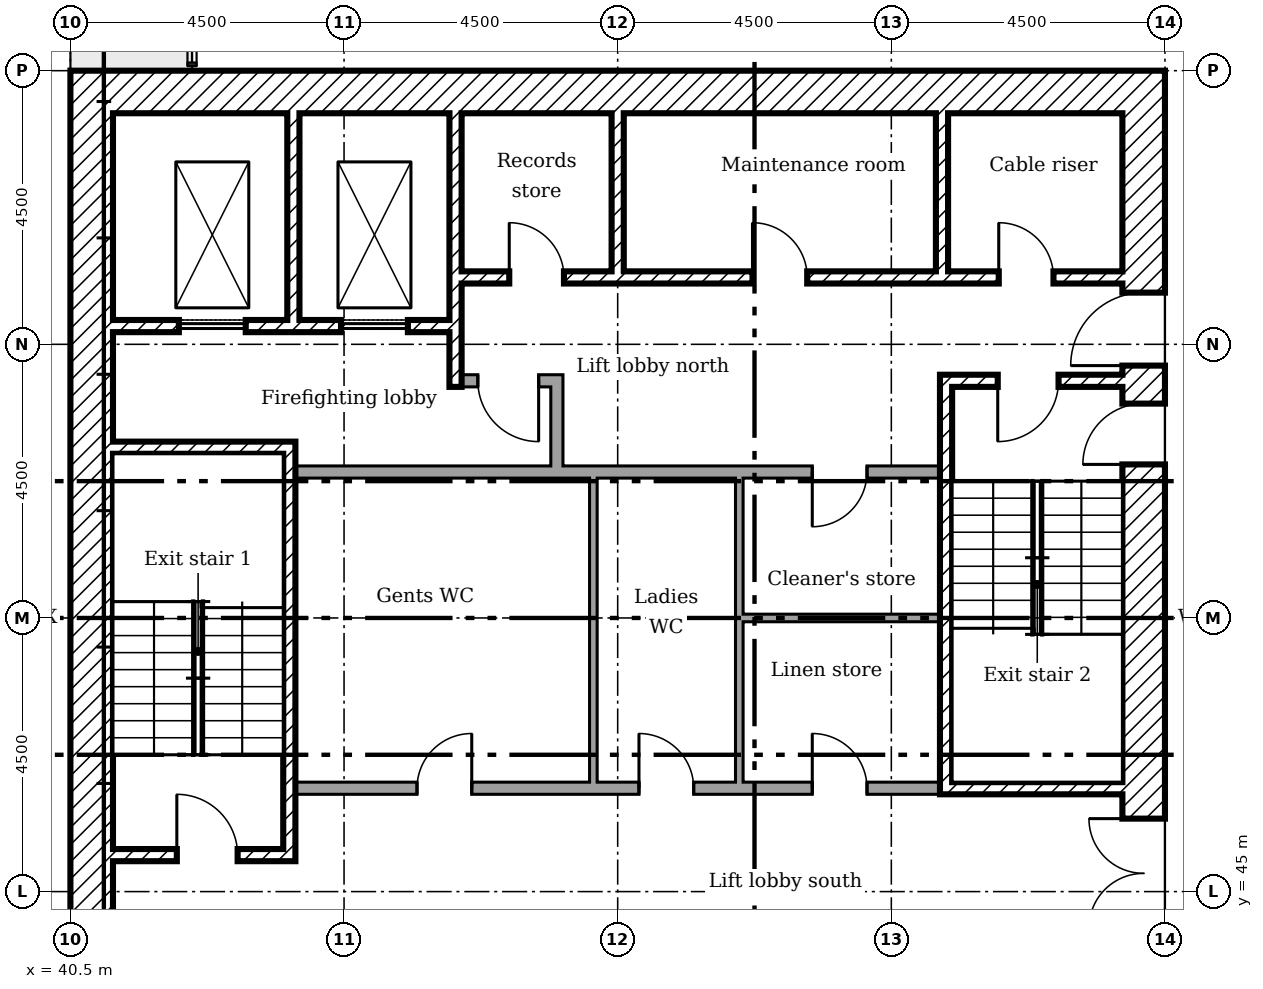
"""IFC4 building model, lengths in metres.
Left out: names, types, materials, properties, quantities, classifications, styles, units other than length and angle.
Written with IfcOpenShell. Run it as: python <this file> out.ifc"""

import sys

from ifc_helpers import new_model, si_unit, direction, frame, frame_2d, origin, place, context, subcontext, project, spatial, rectangle, extrude, element, fill, save


model = new_model("IFC4")
c1 = context("Model", 3, precision=1e-05, world=origin(), true_north=direction((0.0, 1.0)))
c2 = subcontext(c1, "Body", "Model", "MODEL_VIEW")
j1 = project(units=[si_unit("LENGTHUNIT", "METRE"), si_unit("PLANEANGLEUNIT", "RADIAN")], contexts=[c1])
p1 = place(None, origin())
s1 = spatial("IfcSite", under=j1, at=p1, CompositionType="ELEMENT")
p2 = place(p1, origin())
s2 = spatial("IfcBuilding", under=s1, at=p2, CompositionType="ELEMENT")
p3 = place(p2, frame((0.0, 0.0, 131.6)))
s3 = spatial("IfcBuildingStorey", under=s2, at=p3, CompositionType="ELEMENT", Elevation=131.6)
p4 = place(p3, frame((58.15, 40.5, 0.0), z_axis=(0.0, 0.0, 1.0), x_axis=(0.0, 1.0, 0.0)))
e1 = element("IfcWall", 1, at=p4, inside=s3, PredefinedType="SHEAR", context=c2, shape_type="SweptSolid", body=[
    extrude(rectangle(XDim=18.0, YDim=0.7, at=frame_2d((9.0, 0.0))), origin(), (0.0, 0.0, 1.0), 3.35),
])
p5 = place(p4, frame((13.15, 0.0, 0.0)))
e2 = element("IfcOpeningElement", 2, at=p5, cuts=e1, PredefinedType="OPENING", context=c2, shape_type="SweptSolid", body=[
    extrude(rectangle(XDim=1.2, YDim=2.1, at=frame_2d((0.6, 1.05))), frame((0.0, 0.36, 0.0), z_axis=(0.0, -1.0, 0.0), x_axis=(1.0, 0.0, 0.0)), (0.0, 0.0, 1.0), 0.72),
])
p6 = place(p4, frame((3.9, 0.0, 0.0)))
e3 = element("IfcOpeningElement", 3, at=p6, cuts=e1, PredefinedType="OPENING", context=c2, shape_type="SweptSolid", body=[
    extrude(rectangle(XDim=1.8, YDim=2.1, at=frame_2d((0.9, 1.05))), frame((0.0, 0.36, 0.0), z_axis=(0.0, -1.0, 0.0), x_axis=(1.0, 0.0, 0.0)), (0.0, 0.0, 1.0), 0.72),
])
p7 = place(p4, frame((11.525, 0.0, 0.0)))
e4 = element("IfcOpeningElement", 4, at=p7, cuts=e1, PredefinedType="OPENING", context=c2, shape_type="SweptSolid", body=[
    extrude(rectangle(XDim=1.0, YDim=2.1, at=frame_2d((0.5, 1.05))), frame((0.0, 0.36, 0.0), z_axis=(0.0, -1.0, 0.0), x_axis=(1.0, 0.0, 0.0)), (0.0, 0.0, 1.0), 0.72),
])
p8 = place(p3, frame((41.2, 58.15, 0.0)))
e5 = element("IfcWall", 5, at=p8, inside=s3, PredefinedType="SHEAR", context=c2, shape_type="SweptSolid", body=[
    extrude(rectangle(XDim=16.6, YDim=0.7, at=frame_2d((8.3, 0.0))), origin(), (0.0, 0.0, 1.0), 3.35),
])
p9 = place(p3, frame((40.85, 40.5, 0.0), z_axis=(0.0, 0.0, 1.0), x_axis=(0.0, 1.0, 0.0)))
e6 = element("IfcWall", 6, at=p9, inside=s3, PredefinedType="SHEAR", context=c2, shape_type="SweptSolid", body=[
    extrude(rectangle(XDim=18.0, YDim=0.7, at=frame_2d((9.0, 0.0))), origin(), (0.0, 0.0, 1.0), 3.35),
])
p10 = place(p3, frame((44.167, 57.8, 0.0), z_axis=(0.0, 0.0, 1.0), x_axis=(0.0, -1.0, 0.0)))
e7 = element("IfcWall", 7, at=p10, inside=s3, PredefinedType="SHEAR", context=c2, shape_type="SweptSolid", body=[
    extrude(rectangle(XDim=3.4, YDim=0.2, at=frame_2d((1.7, 0.0))), origin(), (0.0, 0.0, 1.0), 3.35),
])
p11 = place(p3, frame((46.833, 57.8, 0.0), z_axis=(0.0, 0.0, 1.0), x_axis=(0.0, -1.0, 0.0)))
e8 = element("IfcWall", 8, at=p11, inside=s3, PredefinedType="SHEAR", context=c2, shape_type="SweptSolid", body=[
    extrude(rectangle(XDim=4.5, YDim=0.2, at=frame_2d((2.25, 0.0))), origin(), (0.0, 0.0, 1.0), 3.35),
])
for number, where, z_axis, x_axis in (
    (9, (49.5, 57.8, 0.0), (0.0, 0.0, 1.0), (0.0, -1.0, 0.0)),
    (10, (54.833, 57.8, 0.0), (0.0, 0.0, 1.0), (0.0, -1.0, 0.0)),
):
    element("IfcWall", number, at=place(p3, frame(where, z_axis=z_axis, x_axis=x_axis)), inside=s3, PredefinedType="SHEAR", context=c2, shape_type="SweptSolid", body=[
        extrude(rectangle(XDim=2.6, YDim=0.2, at=frame_2d((1.3, 0.0))), origin(), (0.0, 0.0, 1.0), 3.35),
    ])
p12 = place(p3, frame((48.5, 51.9, 0.0), z_axis=(0.0, 0.0, 1.0), x_axis=(0.0, 1.0, 0.0)))
e11 = element("IfcWall", 11, at=p12, inside=s3, PredefinedType="PARTITIONING", context=c2, shape_type="SweptSolid", body=[
    extrude(rectangle(XDim=1.6, YDim=0.2, at=frame_2d((0.8, 0.0))), origin(), (0.0, 0.0, 1.0), 3.35),
])
p13 = place(p3, frame((46.933, 53.4, 0.0)))
e12 = element("IfcWall", 12, at=p13, inside=s3, PredefinedType="PARTITIONING", context=c2, shape_type="SweptSolid", body=[
    extrude(rectangle(XDim=1.467, YDim=0.2, at=frame_2d((0.733, 0.0))), origin(), (0.0, 0.0, 1.0), 3.35),
])
p14 = place(p13, frame((0.267, 0.0, 0.0)))
e13 = element("IfcOpeningElement", 13, at=p14, cuts=e12, PredefinedType="OPENING", context=c2, shape_type="SweptSolid", body=[
    extrude(rectangle(XDim=1.0, YDim=2.1, at=frame_2d((0.5, 1.05))), frame((0.0, 0.11, 0.0), z_axis=(0.0, -1.0, 0.0), x_axis=(1.0, 0.0, 0.0)), (0.0, 0.0, 1.0), 0.22),
])
p15 = place(p3, frame((46.933, 55.1, 0.0)))
e14 = element("IfcWall", 14, at=p15, inside=s3, PredefinedType="SHEAR", context=c2, shape_type="SweptSolid", body=[
    extrude(rectangle(XDim=10.867, YDim=0.2, at=frame_2d((5.433, 0.0))), origin(), (0.0, 0.0, 1.0), 3.35),
])
p16 = place(p15, frame((8.833, 0.0, 0.0)))
e15 = element("IfcOpeningElement", 15, at=p16, cuts=e14, PredefinedType="OPENING", context=c2, shape_type="SweptSolid", body=[
    extrude(rectangle(XDim=0.9, YDim=2.1, at=frame_2d((0.45, 1.05))), frame((0.0, 0.11, 0.0), z_axis=(0.0, -1.0, 0.0), x_axis=(1.0, 0.0, 0.0)), (0.0, 0.0, 1.0), 0.22),
])
p17 = place(p15, frame((0.783, 0.0, 0.0)))
e16 = element("IfcOpeningElement", 16, at=p17, cuts=e14, PredefinedType="OPENING", context=c2, shape_type="SweptSolid", body=[
    extrude(rectangle(XDim=0.9, YDim=2.1, at=frame_2d((0.45, 1.05))), frame((0.0, 0.11, 0.0), z_axis=(0.0, -1.0, 0.0), x_axis=(1.0, 0.0, 0.0)), (0.0, 0.0, 1.0), 0.22),
])
p18 = place(p15, frame((4.783, 0.0, 0.0)))
e17 = element("IfcOpeningElement", 17, at=p18, cuts=e14, PredefinedType="OPENING", context=c2, shape_type="SweptSolid", body=[
    extrude(rectangle(XDim=0.9, YDim=2.1, at=frame_2d((0.45, 1.05))), frame((0.0, 0.11, 0.0), z_axis=(0.0, -1.0, 0.0), x_axis=(1.0, 0.0, 0.0)), (0.0, 0.0, 1.0), 0.22),
])
p19 = place(p3, frame((41.2, 54.3, 0.0)))
e18 = element("IfcWall", 18, at=p19, inside=s3, PredefinedType="SHEAR", context=c2, shape_type="SweptSolid", body=[
    extrude(rectangle(XDim=5.533, YDim=0.2, at=frame_2d((2.767, 0.0))), origin(), (0.0, 0.0, 1.0), 3.35),
])
p20 = place(p19, frame((1.083, 0.0, 0.0)))
e19 = element("IfcOpeningElement", 19, at=p20, cuts=e18, PredefinedType="OPENING", context=c2, shape_type="SweptSolid", body=[
    extrude(rectangle(XDim=1.1, YDim=2.1, at=frame_2d((0.55, 1.05))), frame((0.0, 0.11, 0.0), z_axis=(0.0, -1.0, 0.0), x_axis=(1.0, 0.0, 0.0)), (0.0, 0.0, 1.0), 0.22),
])
p21 = place(p19, frame((3.75, 0.0, 0.0)))
e20 = element("IfcOpeningElement", 20, at=p21, cuts=e18, PredefinedType="OPENING", context=c2, shape_type="SweptSolid", body=[
    extrude(rectangle(XDim=1.1, YDim=2.1, at=frame_2d((0.55, 1.05))), frame((0.0, 0.11, 0.0), z_axis=(0.0, -1.0, 0.0), x_axis=(1.0, 0.0, 0.0)), (0.0, 0.0, 1.0), 0.22),
])
p22 = place(p3, frame((44.1, 45.5, 0.0), z_axis=(0.0, 0.0, 1.0), x_axis=(0.0, 1.0, 0.0)))
e21 = element("IfcWall", 21, at=p22, inside=s3, PredefinedType="SHEAR", context=c2, shape_type="SweptSolid", body=[
    extrude(rectangle(XDim=6.9, YDim=0.2, at=frame_2d((3.45, 0.0))), origin(), (0.0, 0.0, 1.0), 3.35),
])
p23 = place(p3, frame((41.2, 52.3, 0.0)))
e22 = element("IfcWall", 22, at=p23, inside=s3, PredefinedType="SHEAR", context=c2, shape_type="SweptSolid", body=[
    extrude(rectangle(XDim=2.8, YDim=0.2, at=frame_2d((1.4, 0.0))), origin(), (0.0, 0.0, 1.0), 3.35),
])
p24 = place(p3, frame((41.2, 45.6, 0.0)))
e23 = element("IfcWall", 23, at=p24, inside=s3, PredefinedType="SHEAR", context=c2, shape_type="SweptSolid", body=[
    extrude(rectangle(XDim=2.8, YDim=0.2, at=frame_2d((1.4, 0.0))), origin(), (0.0, 0.0, 1.0), 3.35),
])
p25 = place(p24, frame((1.05, 0.0, 0.0)))
e24 = element("IfcOpeningElement", 24, at=p25, cuts=e23, PredefinedType="OPENING", context=c2, shape_type="SweptSolid", body=[
    extrude(rectangle(XDim=1.0, YDim=2.1, at=frame_2d((0.5, 1.05))), frame((0.0, 0.11, 0.0), z_axis=(0.0, -1.0, 0.0), x_axis=(1.0, 0.0, 0.0)), (0.0, 0.0, 1.0), 0.22),
])
p26 = place(p3, frame((54.8, 53.4, 0.0)))
e25 = element("IfcWall", 25, at=p26, inside=s3, PredefinedType="SHEAR", context=c2, shape_type="SweptSolid", body=[
    extrude(rectangle(XDim=3.0, YDim=0.2, at=frame_2d((1.5, 0.0))), origin(), (0.0, 0.0, 1.0), 3.35),
])
p27 = place(p26, frame((0.95, 0.0, 0.0)))
e26 = element("IfcOpeningElement", 26, at=p27, cuts=e25, PredefinedType="OPENING", context=c2, shape_type="SweptSolid", body=[
    extrude(rectangle(XDim=1.0, YDim=2.1, at=frame_2d((0.5, 1.05))), frame((0.0, 0.11, 0.0), z_axis=(0.0, -1.0, 0.0), x_axis=(1.0, 0.0, 0.0)), (0.0, 0.0, 1.0), 0.22),
])
p28 = place(p3, frame((54.8, 46.7, 0.0)))
e27 = element("IfcWall", 27, at=p28, inside=s3, PredefinedType="SHEAR", context=c2, shape_type="SweptSolid", body=[
    extrude(rectangle(XDim=3.0, YDim=0.2, at=frame_2d((1.5, 0.0))), origin(), (0.0, 0.0, 1.0), 3.35),
])
p29 = place(p3, frame((54.9, 46.8, 0.0), z_axis=(0.0, 0.0, 1.0), x_axis=(0.0, 1.0, 0.0)))
e28 = element("IfcWall", 28, at=p29, inside=s3, PredefinedType="SHEAR", context=c2, shape_type="SweptSolid", body=[
    extrude(rectangle(XDim=6.5, YDim=0.2, at=frame_2d((3.25, 0.0))), origin(), (0.0, 0.0, 1.0), 3.35),
])
p30 = place(p3, frame((44.2, 51.9, 0.0)))
e29 = element("IfcWall", 29, at=p30, inside=s3, PredefinedType="PARTITIONING", context=c2, shape_type="SweptSolid", body=[
    extrude(rectangle(XDim=10.6, YDim=0.2, at=frame_2d((5.3, 0.0))), origin(), (0.0, 0.0, 1.0), 3.35),
])
p31 = place(p30, frame((8.5, 0.0, 0.0)))
e30 = element("IfcOpeningElement", 30, at=p31, cuts=e29, PredefinedType="OPENING", context=c2, shape_type="SweptSolid", body=[
    extrude(rectangle(XDim=0.9, YDim=2.1, at=frame_2d((0.45, 1.05))), frame((0.0, 0.11, 0.0), z_axis=(0.0, -1.0, 0.0), x_axis=(1.0, 0.0, 0.0)), (0.0, 0.0, 1.0), 0.22),
])
p32 = place(p3, frame((44.2, 46.7, 0.0)))
e31 = element("IfcWall", 31, at=p32, inside=s3, PredefinedType="PARTITIONING", context=c2, shape_type="SweptSolid", body=[
    extrude(rectangle(XDim=10.6, YDim=0.2, at=frame_2d((5.3, 0.0))), origin(), (0.0, 0.0, 1.0), 3.35),
])
p33 = place(p32, frame((2.0, 0.0, 0.0)))
e32 = element("IfcOpeningElement", 32, at=p33, cuts=e31, PredefinedType="OPENING", context=c2, shape_type="SweptSolid", body=[
    extrude(rectangle(XDim=0.9, YDim=2.1, at=frame_2d((0.45, 1.05))), frame((0.0, 0.11, 0.0), z_axis=(0.0, -1.0, 0.0), x_axis=(1.0, 0.0, 0.0)), (0.0, 0.0, 1.0), 0.22),
])
p34 = place(p32, frame((5.65, 0.0, 0.0)))
e33 = element("IfcOpeningElement", 33, at=p34, cuts=e31, PredefinedType="OPENING", context=c2, shape_type="SweptSolid", body=[
    extrude(rectangle(XDim=0.9, YDim=2.1, at=frame_2d((0.45, 1.05))), frame((0.0, 0.11, 0.0), z_axis=(0.0, -1.0, 0.0), x_axis=(1.0, 0.0, 0.0)), (0.0, 0.0, 1.0), 0.22),
])
p35 = place(p32, frame((8.5, 0.0, 0.0)))
e34 = element("IfcOpeningElement", 34, at=p35, cuts=e31, PredefinedType="OPENING", context=c2, shape_type="SweptSolid", body=[
    extrude(rectangle(XDim=0.9, YDim=2.1, at=frame_2d((0.45, 1.05))), frame((0.0, 0.11, 0.0), z_axis=(0.0, -1.0, 0.0), x_axis=(1.0, 0.0, 0.0)), (0.0, 0.0, 1.0), 0.22),
])
p36 = place(p3, frame((49.1, 46.8, 0.0), z_axis=(0.0, 0.0, 1.0), x_axis=(0.0, 1.0, 0.0)))
e35 = element("IfcWall", 35, at=p36, inside=s3, PredefinedType="PARTITIONING", context=c2, shape_type="SweptSolid", body=[
    extrude(rectangle(XDim=5.0, YDim=0.125, at=frame_2d((2.5, 0.0))), origin(), (0.0, 0.0, 1.0), 3.35),
])
p37 = place(p3, frame((51.5, 46.8, 0.0), z_axis=(0.0, 0.0, 1.0), x_axis=(0.0, 1.0, 0.0)))
e36 = element("IfcWall", 36, at=p37, inside=s3, PredefinedType="PARTITIONING", context=c2, shape_type="SweptSolid", body=[
    extrude(rectangle(XDim=2.762, YDim=0.125, at=frame_2d((1.381, 0.0))), origin(), (0.0, 0.0, 1.0), 3.35),
])
p38 = place(p3, frame((51.562, 49.5, 0.0)))
e37 = element("IfcWall", 37, at=p38, inside=s3, PredefinedType="PARTITIONING", context=c2, shape_type="SweptSolid", body=[
    extrude(rectangle(XDim=3.238, YDim=0.125, at=frame_2d((1.619, 0.0))), origin(), (0.0, 0.0, 1.0), 3.35),
])
p39 = place(p3, frame((51.5, 49.5, 0.0), z_axis=(0.0, 0.0, 1.0), x_axis=(0.0, 1.0, 0.0)))
e38 = element("IfcWall", 38, at=p39, inside=s3, PredefinedType="PARTITIONING", context=c2, shape_type="SweptSolid", body=[
    extrude(rectangle(XDim=2.3, YDim=0.125, at=frame_2d((1.15, 0.0))), origin(), (0.0, 0.0, 1.0), 3.35),
])
p40 = place(p5, origin())
e39 = element("IfcDoor", 39, at=p40, inside=s3, OperationType="SINGLE_SWING_RIGHT", PredefinedType="DOOR", context=c2, shape_type="SweptSolid", body=[
    extrude(rectangle(XDim=1.2, YDim=2.1, at=frame_2d((0.6, 1.05))), frame((0.0, 0.025, 0.0), z_axis=(0.0, -1.0, 0.0), x_axis=(1.0, 0.0, 0.0)), (0.0, 0.0, 1.0), 0.05),
])
fill(e2, e39)
p41 = place(p6, origin())
e40 = element("IfcDoor", 40, at=p41, inside=s3, OperationType="DOUBLE_DOOR_SINGLE_SWING", PredefinedType="DOOR", context=c2, shape_type="SweptSolid", body=[
    extrude(rectangle(XDim=1.8, YDim=2.1, at=frame_2d((0.9, 1.05))), frame((0.0, 0.025, 0.0), z_axis=(0.0, -1.0, 0.0), x_axis=(1.0, 0.0, 0.0)), (0.0, 0.0, 1.0), 0.05),
])
fill(e3, e40)
p42 = place(p25, origin())
e41 = element("IfcDoor", 41, at=p42, inside=s3, OperationType="SINGLE_SWING_RIGHT", PredefinedType="DOOR", context=c2, shape_type="SweptSolid", body=[
    extrude(rectangle(XDim=1.0, YDim=2.1, at=frame_2d((0.5, 1.05))), frame((0.0, 0.025, 0.0), z_axis=(0.0, -1.0, 0.0), x_axis=(1.0, 0.0, 0.0)), (0.0, 0.0, 1.0), 0.05),
])
fill(e24, e41)
p43 = place(p27, frame((1.0, 0.0, 0.0), x_axis=(-1.0, 0.0, 0.0)))
e42 = element("IfcDoor", 42, at=p43, inside=s3, OperationType="SINGLE_SWING_LEFT", PredefinedType="DOOR", context=c2, shape_type="SweptSolid", body=[
    extrude(rectangle(XDim=1.0, YDim=2.1, at=frame_2d((0.5, 1.05))), frame((0.0, 0.025, 0.0), z_axis=(0.0, -1.0, 0.0), x_axis=(1.0, 0.0, 0.0)), (0.0, 0.0, 1.0), 0.05),
])
fill(e26, e42)
p44 = place(p7, origin())
e43 = element("IfcDoor", 43, at=p44, inside=s3, OperationType="SINGLE_SWING_RIGHT", PredefinedType="DOOR", context=c2, shape_type="SweptSolid", body=[
    extrude(rectangle(XDim=1.0, YDim=2.1, at=frame_2d((0.5, 1.05))), frame((0.0, 0.025, 0.0), z_axis=(0.0, -1.0, 0.0), x_axis=(1.0, 0.0, 0.0)), (0.0, 0.0, 1.0), 0.05),
])
fill(e4, e43)
p45 = place(p14, frame((1.0, 0.0, 0.0), x_axis=(-1.0, 0.0, 0.0)))
e44 = element("IfcDoor", 44, at=p45, inside=s3, OperationType="SINGLE_SWING_RIGHT", PredefinedType="DOOR", context=c2, shape_type="SweptSolid", body=[
    extrude(rectangle(XDim=1.0, YDim=2.1, at=frame_2d((0.5, 1.05))), frame((0.0, 0.025, 0.0), z_axis=(0.0, -1.0, 0.0), x_axis=(1.0, 0.0, 0.0)), (0.0, 0.0, 1.0), 0.05),
])
fill(e13, e44)
p46 = place(p16, origin())
e45 = element("IfcDoor", 45, at=p46, inside=s3, OperationType="SINGLE_SWING_RIGHT", PredefinedType="DOOR", context=c2, shape_type="SweptSolid", body=[
    extrude(rectangle(XDim=0.9, YDim=2.1, at=frame_2d((0.45, 1.05))), frame((0.0, 0.025, 0.0), z_axis=(0.0, -1.0, 0.0), x_axis=(1.0, 0.0, 0.0)), (0.0, 0.0, 1.0), 0.05),
])
fill(e15, e45)
p47 = place(p17, origin())
e46 = element("IfcDoor", 46, at=p47, inside=s3, OperationType="SINGLE_SWING_RIGHT", PredefinedType="DOOR", context=c2, shape_type="SweptSolid", body=[
    extrude(rectangle(XDim=0.9, YDim=2.1, at=frame_2d((0.45, 1.05))), frame((0.0, 0.025, 0.0), z_axis=(0.0, -1.0, 0.0), x_axis=(1.0, 0.0, 0.0)), (0.0, 0.0, 1.0), 0.05),
])
fill(e16, e46)
p48 = place(p18, origin())
e47 = element("IfcDoor", 47, at=p48, inside=s3, OperationType="SINGLE_SWING_RIGHT", PredefinedType="DOOR", context=c2, shape_type="SweptSolid", body=[
    extrude(rectangle(XDim=0.9, YDim=2.1, at=frame_2d((0.45, 1.05))), frame((0.0, 0.025, 0.0), z_axis=(0.0, -1.0, 0.0), x_axis=(1.0, 0.0, 0.0)), (0.0, 0.0, 1.0), 0.05),
])
fill(e17, e47)
p49 = place(p33, origin())
e48 = element("IfcDoor", 48, at=p49, inside=s3, OperationType="SINGLE_SWING_LEFT", PredefinedType="DOOR", context=c2, shape_type="SweptSolid", body=[
    extrude(rectangle(XDim=0.9, YDim=2.1, at=frame_2d((0.45, 1.05))), frame((0.0, 0.025, 0.0), z_axis=(0.0, -1.0, 0.0), x_axis=(1.0, 0.0, 0.0)), (0.0, 0.0, 1.0), 0.05),
])
fill(e32, e48)
p50 = place(p34, origin())
e49 = element("IfcDoor", 49, at=p50, inside=s3, OperationType="SINGLE_SWING_RIGHT", PredefinedType="DOOR", context=c2, shape_type="SweptSolid", body=[
    extrude(rectangle(XDim=0.9, YDim=2.1, at=frame_2d((0.45, 1.05))), frame((0.0, 0.025, 0.0), z_axis=(0.0, -1.0, 0.0), x_axis=(1.0, 0.0, 0.0)), (0.0, 0.0, 1.0), 0.05),
])
fill(e33, e49)
p51 = place(p31, frame((0.9, 0.0, 0.0), x_axis=(-1.0, 0.0, 0.0)))
e50 = element("IfcDoor", 50, at=p51, inside=s3, OperationType="SINGLE_SWING_LEFT", PredefinedType="DOOR", context=c2, shape_type="SweptSolid", body=[
    extrude(rectangle(XDim=0.9, YDim=2.1, at=frame_2d((0.45, 1.05))), frame((0.0, 0.025, 0.0), z_axis=(0.0, -1.0, 0.0), x_axis=(1.0, 0.0, 0.0)), (0.0, 0.0, 1.0), 0.05),
])
fill(e30, e50)
p52 = place(p35, origin())
e51 = element("IfcDoor", 51, at=p52, inside=s3, OperationType="SINGLE_SWING_RIGHT", PredefinedType="DOOR", context=c2, shape_type="SweptSolid", body=[
    extrude(rectangle(XDim=0.9, YDim=2.1, at=frame_2d((0.45, 1.05))), frame((0.0, 0.025, 0.0), z_axis=(0.0, -1.0, 0.0), x_axis=(1.0, 0.0, 0.0)), (0.0, 0.0, 1.0), 0.05),
])
fill(e34, e51)
p53 = place(p20, origin())
e52 = element("IfcDoor", 52, at=p53, inside=s3, OperationType="SLIDING_TO_LEFT", PredefinedType="DOOR", context=c2, shape_type="SweptSolid", body=[
    extrude(rectangle(XDim=1.1, YDim=2.1, at=frame_2d((0.55, 1.05))), frame((0.0, 0.025, 0.0), z_axis=(0.0, -1.0, 0.0), x_axis=(1.0, 0.0, 0.0)), (0.0, 0.0, 1.0), 0.05),
])
fill(e19, e52)
p54 = place(p21, origin())
e53 = element("IfcDoor", 53, at=p54, inside=s3, OperationType="SLIDING_TO_LEFT", PredefinedType="DOOR", context=c2, shape_type="SweptSolid", body=[
    extrude(rectangle(XDim=1.1, YDim=2.1, at=frame_2d((0.55, 1.05))), frame((0.0, 0.025, 0.0), z_axis=(0.0, -1.0, 0.0), x_axis=(1.0, 0.0, 0.0)), (0.0, 0.0, 1.0), 0.05),
])
fill(e20, e53)
save(model, sys.argv[1])
